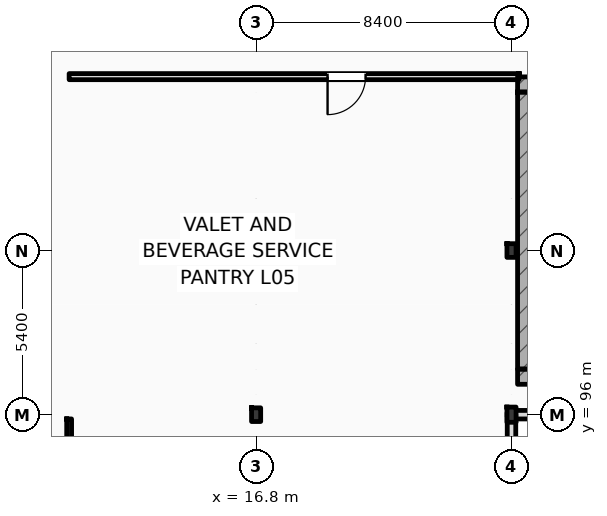
"""IFC4 building model, lengths in metres.
Left out: names, types, materials, properties, quantities, classifications, styles, units other than length and angle.
Written with IfcOpenShell. Run it as: python <this file> out.ifc"""

import sys

from ifc_helpers import new_model, si_unit, direction, frame, frame_2d, origin, origin_2d, place, context, subcontext, project, spatial, rectangle, i_section, extrude, element, fill, save


model = new_model("IFC4")
c1 = context("Model", 3, precision=1e-05, world=origin(), true_north=direction((0.0, 1.0)))
c2 = subcontext(c1, "Body", "Model", "MODEL_VIEW")
j1 = project(units=[si_unit("LENGTHUNIT", "METRE"), si_unit("PLANEANGLEUNIT", "RADIAN")], contexts=[c1])
p1 = place(None, origin())
s1 = spatial("IfcSite", under=j1, at=p1, CompositionType="ELEMENT")
p2 = place(p1, origin())
s2 = spatial("IfcBuilding", under=s1, at=p2, CompositionType="ELEMENT")
p3 = place(p2, frame((0.0, 0.0, 24.6)))
s3 = spatial("IfcBuildingStorey", under=s2, at=p3, CompositionType="ELEMENT", Elevation=24.6)
p4 = place(p3, frame((16.8, 96.0, 0.0), z_axis=(0.0, 0.0, 1.0), x_axis=(1.0, 0.0, 0.0)))
e1 = element("IfcColumn", 1, at=p4, inside=s3, PredefinedType="COLUMN", context=c2, shape_type="SweptSolid", body=[
    extrude(i_section(OverallWidth=0.3, OverallDepth=0.45, WebThickness=0.014, FlangeThickness=0.026, FilletRadius=0.027, at=origin_2d()), origin(), (0.0, 0.0, 1.0), 3.6),
])
p5 = place(p3, frame((25.2, 96.0, 0.0), z_axis=(0.0, 0.0, 1.0), x_axis=(1.0, 0.0, 0.0)))
e2 = element("IfcColumn", 2, at=p5, inside=s3, PredefinedType="COLUMN", context=c2, shape_type="SweptSolid", body=[
    extrude(i_section(OverallWidth=0.3, OverallDepth=0.5, WebThickness=0.014, FlangeThickness=0.028, FilletRadius=0.027, at=origin_2d()), origin(), (0.0, 0.0, 1.0), 3.6),
])
for number, where, z_axis, x_axis in (
    (3, (16.8, 101.4, 0.0), (0.0, 0.0, 1.0), (1.0, 0.0, 0.0)),
    (4, (25.2, 101.4, 0.0), (0.0, 0.0, 1.0), (1.0, 0.0, 0.0)),
):
    element("IfcColumn", number, at=place(p3, frame(where, z_axis=z_axis, x_axis=x_axis)), inside=s3, PredefinedType="COLUMN", context=c2, shape_type="SweptSolid", body=[
        extrude(i_section(OverallWidth=0.3, OverallDepth=0.45, WebThickness=0.014, FlangeThickness=0.026, FilletRadius=0.027, at=origin_2d()), origin(), (0.0, 0.0, 1.0), 3.6),
    ])
for number, where, z_axis, x_axis in (
    (5, (25.4, 106.862, 0.0), (0.0, 0.0, 1.0), (1.0, 0.0, 0.0)),
    (6, (25.4, 97.25, 0.0), (0.0, 0.0, 1.0), (1.0, 0.0, 0.0)),
):
    element("IfcWall", number, at=place(p3, frame(where, z_axis=z_axis, x_axis=x_axis)), inside=s3, PredefinedType="SHEAR", context=c2, shape_type="SweptSolid", body=[
        extrude(rectangle(XDim=5.16, YDim=0.5, at=frame_2d((2.58, 0.0))), origin(), (0.0, 0.0, 1.0), 3.6),
    ])
p6 = place(p3, frame((25.65, 97.5, 0.0), z_axis=(0.0, 0.0, 1.0), x_axis=(0.0, 1.0, 0.0)))
e7 = element("IfcWall", 7, at=p6, inside=s3, PredefinedType="SHEAR", context=c2, shape_type="SweptSolid", body=[
    extrude(rectangle(XDim=9.112, YDim=0.5, at=frame_2d((4.556, 0.0))), origin(), (0.0, 0.0, 1.0), 3.6),
])
p7 = place(p3, frame((25.2, 96.0, 0.0), z_axis=(0.0, 0.0, 1.0), x_axis=(1.0, 0.0, 0.0)))
e8 = element("IfcWall", 8, at=p7, inside=s3, PredefinedType="STANDARD", context=c2, shape_type="SweptSolid", body=[
    extrude(rectangle(XDim=94.8, YDim=0.28, at=frame_2d((47.4, 0.0))), origin(), (0.0, 0.0, 1.0), 2.78),
])
p8 = place(p7, frame((16.539, 0.0, 0.9)))
e9 = element("IfcOpeningElement", 9, at=p8, cuts=e8, PredefinedType="OPENING", context=c2, shape_type="SweptSolid", body=[
    extrude(rectangle(XDim=1.75, YDim=1.7, at=frame_2d((0.875, 0.85))), frame((0.0, 0.15, 0.0), z_axis=(0.0, -1.0, 0.0), x_axis=(1.0, 0.0, 0.0)), (0.0, 0.0, 1.0), 0.3),
])
p9 = place(p7, frame((20.367, 0.0, 0.9)))
e10 = element("IfcOpeningElement", 10, at=p9, cuts=e8, PredefinedType="OPENING", context=c2, shape_type="SweptSolid", body=[
    extrude(rectangle(XDim=2.0, YDim=1.7, at=frame_2d((1.0, 0.85))), frame((0.0, 0.15, 0.0), z_axis=(0.0, -1.0, 0.0), x_axis=(1.0, 0.0, 0.0)), (0.0, 0.0, 1.0), 0.3),
])
p10 = place(p7, frame((24.326, 0.0, 0.9)))
e11 = element("IfcOpeningElement", 11, at=p10, cuts=e8, PredefinedType="OPENING", context=c2, shape_type="SweptSolid", body=[
    extrude(rectangle(XDim=2.3, YDim=1.7, at=frame_2d((1.15, 0.85))), frame((0.0, 0.15, 0.0), z_axis=(0.0, -1.0, 0.0), x_axis=(1.0, 0.0, 0.0)), (0.0, 0.0, 1.0), 0.3),
])
p11 = place(p7, frame((27.684, 0.0, 0.9)))
e12 = element("IfcOpeningElement", 12, at=p11, cuts=e8, PredefinedType="OPENING", context=c2, shape_type="SweptSolid", body=[
    extrude(rectangle(XDim=2.6, YDim=1.7, at=frame_2d((1.3, 0.85))), frame((0.0, 0.15, 0.0), z_axis=(0.0, -1.0, 0.0), x_axis=(1.0, 0.0, 0.0)), (0.0, 0.0, 1.0), 0.3),
])
p12 = place(p7, frame((32.083, 0.0, 0.9)))
e13 = element("IfcOpeningElement", 13, at=p12, cuts=e8, PredefinedType="OPENING", context=c2, shape_type="SweptSolid", body=[
    extrude(rectangle(XDim=2.419, YDim=1.7, at=frame_2d((1.209, 0.85))), frame((0.0, 0.15, 0.0), z_axis=(0.0, -1.0, 0.0), x_axis=(1.0, 0.0, 0.0)), (0.0, 0.0, 1.0), 0.3),
])
p13 = place(p7, frame((35.322, 0.0, 0.9)))
e14 = element("IfcOpeningElement", 14, at=p13, cuts=e8, PredefinedType="OPENING", context=c2, shape_type="SweptSolid", body=[
    extrude(rectangle(XDim=2.868, YDim=1.7, at=frame_2d((1.434, 0.85))), frame((0.0, 0.15, 0.0), z_axis=(0.0, -1.0, 0.0), x_axis=(1.0, 0.0, 0.0)), (0.0, 0.0, 1.0), 0.3),
])
p14 = place(p7, frame((56.015, 0.0, 0.9)))
e15 = element("IfcOpeningElement", 15, at=p14, cuts=e8, PredefinedType="OPENING", context=c2, shape_type="SweptSolid", body=[
    extrude(rectangle(XDim=1.2, YDim=1.7, at=frame_2d((0.6, 0.85))), frame((0.0, 0.15, 0.0), z_axis=(0.0, -1.0, 0.0), x_axis=(1.0, 0.0, 0.0)), (0.0, 0.0, 1.0), 0.3),
])
p15 = place(p7, frame((59.888, 0.0, 0.9)))
e16 = element("IfcOpeningElement", 16, at=p15, cuts=e8, PredefinedType="OPENING", context=c2, shape_type="SweptSolid", body=[
    extrude(rectangle(XDim=1.35, YDim=1.7, at=frame_2d((0.675, 0.85))), frame((0.0, 0.15, 0.0), z_axis=(0.0, -1.0, 0.0), x_axis=(1.0, 0.0, 0.0)), (0.0, 0.0, 1.0), 0.3),
])
p16 = place(p7, frame((63.799, 0.0, 0.9)))
e17 = element("IfcOpeningElement", 17, at=p16, cuts=e8, PredefinedType="OPENING", context=c2, shape_type="SweptSolid", body=[
    extrude(rectangle(XDim=1.5, YDim=1.7, at=frame_2d((0.75, 0.85))), frame((0.0, 0.15, 0.0), z_axis=(0.0, -1.0, 0.0), x_axis=(1.0, 0.0, 0.0)), (0.0, 0.0, 1.0), 0.3),
])
p17 = place(p7, frame((67.709, 0.0, 0.9)))
e18 = element("IfcOpeningElement", 18, at=p17, cuts=e8, PredefinedType="OPENING", context=c2, shape_type="SweptSolid", body=[
    extrude(rectangle(XDim=1.65, YDim=1.7, at=frame_2d((0.825, 0.85))), frame((0.0, 0.15, 0.0), z_axis=(0.0, -1.0, 0.0), x_axis=(1.0, 0.0, 0.0)), (0.0, 0.0, 1.0), 0.3),
])
p18 = place(p7, frame((71.618, 0.0, 0.9)))
e19 = element("IfcOpeningElement", 19, at=p18, cuts=e8, PredefinedType="OPENING", context=c2, shape_type="SweptSolid", body=[
    extrude(rectangle(XDim=1.8, YDim=1.7, at=frame_2d((0.9, 0.85))), frame((0.0, 0.15, 0.0), z_axis=(0.0, -1.0, 0.0), x_axis=(1.0, 0.0, 0.0)), (0.0, 0.0, 1.0), 0.3),
])
p19 = place(p7, frame((75.129, 0.0, 0.9)))
e20 = element("IfcOpeningElement", 20, at=p19, cuts=e8, PredefinedType="OPENING", context=c2, shape_type="SweptSolid", body=[
    extrude(rectangle(XDim=1.95, YDim=1.7, at=frame_2d((0.975, 0.85))), frame((0.0, 0.15, 0.0), z_axis=(0.0, -1.0, 0.0), x_axis=(1.0, 0.0, 0.0)), (0.0, 0.0, 1.0), 0.3),
])
p20 = place(p7, frame((79.439, 0.0, 0.9)))
e21 = element("IfcOpeningElement", 21, at=p20, cuts=e8, PredefinedType="OPENING", context=c2, shape_type="SweptSolid", body=[
    extrude(rectangle(XDim=2.1, YDim=1.7, at=frame_2d((1.05, 0.85))), frame((0.0, 0.15, 0.0), z_axis=(0.0, -1.0, 0.0), x_axis=(1.0, 0.0, 0.0)), (0.0, 0.0, 1.0), 0.3),
])
p21 = place(p7, frame((83.349, 0.0, 0.9)))
e22 = element("IfcOpeningElement", 22, at=p21, cuts=e8, PredefinedType="OPENING", context=c2, shape_type="SweptSolid", body=[
    extrude(rectangle(XDim=2.25, YDim=1.7, at=frame_2d((1.125, 0.85))), frame((0.0, 0.15, 0.0), z_axis=(0.0, -1.0, 0.0), x_axis=(1.0, 0.0, 0.0)), (0.0, 0.0, 1.0), 0.3),
])
p22 = place(p7, frame((87.258, 0.0, 0.9)))
e23 = element("IfcOpeningElement", 23, at=p22, cuts=e8, PredefinedType="OPENING", context=c2, shape_type="SweptSolid", body=[
    extrude(rectangle(XDim=2.4, YDim=1.7, at=frame_2d((1.2, 0.85))), frame((0.0, 0.15, 0.0), z_axis=(0.0, -1.0, 0.0), x_axis=(1.0, 0.0, 0.0)), (0.0, 0.0, 1.0), 0.3),
])
p23 = place(p7, frame((91.204, 0.0, 0.9)))
e24 = element("IfcOpeningElement", 24, at=p23, cuts=e8, PredefinedType="OPENING", context=c2, shape_type="SweptSolid", body=[
    extrude(rectangle(XDim=2.55, YDim=1.7, at=frame_2d((1.275, 0.85))), frame((0.0, 0.15, 0.0), z_axis=(0.0, -1.0, 0.0), x_axis=(1.0, 0.0, 0.0)), (0.0, 0.0, 1.0), 0.3),
])
p24 = place(p3, frame((25.2, 79.5, 0.0), z_axis=(0.0, 0.0, 1.0), x_axis=(0.0, 1.0, 0.0)))
e25 = element("IfcWall", 25, at=p24, inside=s3, PredefinedType="STANDARD", context=c2, shape_type="SweptSolid", body=[
    extrude(rectangle(XDim=16.5, YDim=0.28, at=frame_2d((8.25, 0.0))), origin(), (0.0, 0.0, 1.0), 2.93),
])
p25 = place(p3, frame((10.65, 107.12, 0.0), z_axis=(0.0, 0.0, 1.0), x_axis=(1.0, 0.0, 0.0)))
e26 = element("IfcWall", 26, at=p25, inside=s3, PredefinedType="PARTITIONING", context=c2, shape_type="SweptSolid", body=[
    extrude(rectangle(XDim=14.8, YDim=0.2, at=frame_2d((7.4, 0.0))), origin(), (0.0, 0.0, 1.0), 3.34),
])
p26 = place(p25, frame((8.5, 0.0, 0.0)))
e27 = element("IfcOpeningElement", 27, at=p26, cuts=e26, PredefinedType="OPENING", context=c2, shape_type="SweptSolid", body=[
    extrude(rectangle(XDim=1.25, YDim=2.15, at=frame_2d((0.625, 1.075))), frame((0.0, 0.11, 0.0), z_axis=(0.0, -1.0, 0.0), x_axis=(1.0, 0.0, 0.0)), (0.0, 0.0, 1.0), 0.22),
])
p27 = place(p3, frame((10.65, 91.28, 0.0), z_axis=(0.0, 0.0, 1.0), x_axis=(0.0, 1.0, 0.0)))
e28 = element("IfcWall", 28, at=p27, inside=s3, PredefinedType="PARTITIONING", context=c2, shape_type="SweptSolid", body=[
    extrude(rectangle(XDim=4.58, YDim=0.16, at=frame_2d((2.29, 0.0))), origin(), (0.0, 0.0, 1.0), 3.34),
])
p28 = place(p27, frame((2.0, 0.0, 0.0)))
e29 = element("IfcOpeningElement", 29, at=p28, cuts=e28, PredefinedType="OPENING", context=c2, shape_type="SweptSolid", body=[
    extrude(rectangle(XDim=0.9, YDim=2.1, at=frame_2d((0.45, 1.05))), frame((0.0, 0.09, 0.0), z_axis=(0.0, -1.0, 0.0), x_axis=(1.0, 0.0, 0.0)), (0.0, 0.0, 1.0), 0.18),
])
p29 = place(p26, frame((1.25, 0.0, 0.0), z_axis=(0.0, 0.0, 1.0), x_axis=(-1.0, 0.0, 0.0)))
e30 = element("IfcDoor", 30, at=p29, inside=s3, OperationType="SINGLE_SWING_LEFT", PredefinedType="DOOR", context=c2, shape_type="SweptSolid", body=[
    extrude(rectangle(XDim=1.25, YDim=2.15, at=frame_2d((0.625, 1.075))), frame((0.0, 0.025, 0.0), z_axis=(0.0, -1.0, 0.0), x_axis=(1.0, 0.0, 0.0)), (0.0, 0.0, 1.0), 0.05),
])
fill(e27, e30)
save(model, sys.argv[1])
